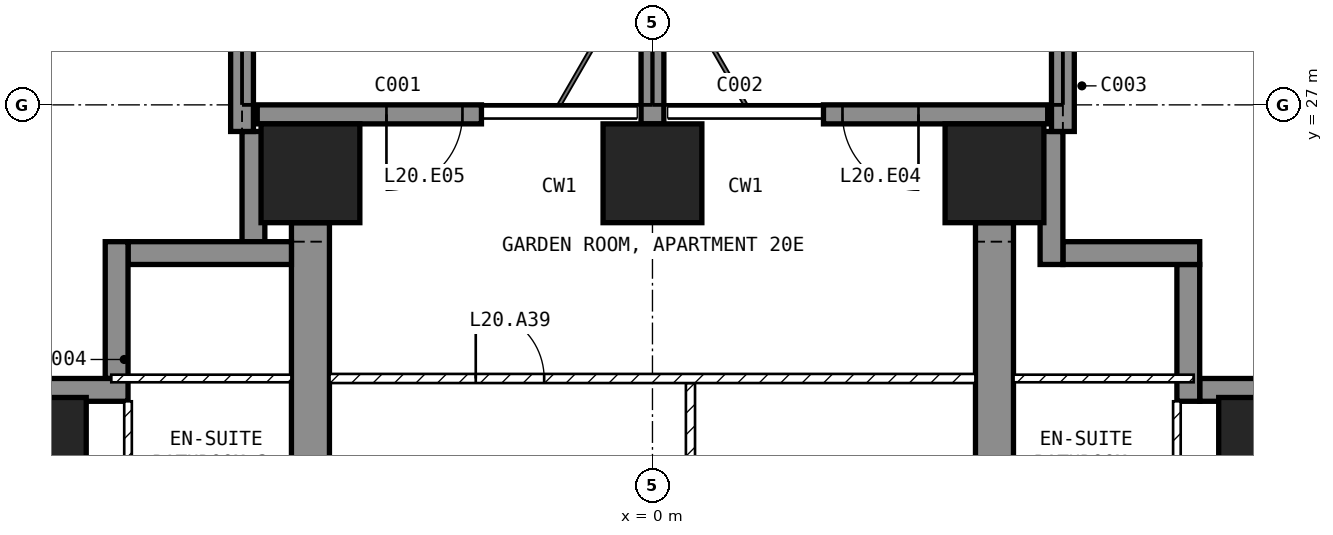
"""IFC4 building model, lengths in metres.
Left out: names, types, materials, properties, quantities, classifications, styles, units other than length and angle.
Written with IfcOpenShell. Run it as: python <this file> out.ifc"""

import sys

from ifc_helpers import new_model, si_unit, direction, frame, frame_2d, origin, origin_2d, place, context, subcontext, project, spatial, polyline, rectangle, outline, extrude, element, fill, save


model = new_model("IFC4")
c1 = context("Model", 3, precision=1e-05, world=origin(), true_north=direction((0.0, 1.0)))
c2 = subcontext(c1, "Body", "Model", "MODEL_VIEW")
j1 = project(units=[si_unit("LENGTHUNIT", "METRE"), si_unit("PLANEANGLEUNIT", "RADIAN")], contexts=[c1])
p1 = place(None, origin())
s1 = spatial("IfcSite", under=j1, at=p1, CompositionType="ELEMENT")
p2 = place(p1, origin())
s2 = spatial("IfcBuilding", under=s1, at=p2, CompositionType="ELEMENT")
p3 = place(p2, frame((0.0, 0.0, 89.0)))
s3 = spatial("IfcBuildingStorey", under=s2, at=p3, CompositionType="ELEMENT", Elevation=89.0)
for number, where, z_axis, x_axis in (
    (1, (-8.1, 22.5, -0.25), (0.0, 0.0, 1.0), (1.0, 0.0, 0.0)),
    (2, (-4.5, 26.1, -0.25), (0.0, 0.0, 1.0), (1.0, 0.0, 0.0)),
    (3, (0.0, 26.1, -0.25), (0.0, 0.0, 1.0), (1.0, 0.0, 0.0)),
    (4, (4.5, 26.1, -0.25), (0.0, 0.0, 1.0), (1.0, 0.0, 0.0)),
    (5, (8.1, 22.5, -0.25), (0.0, 0.0, 1.0), (1.0, 0.0, 0.0)),
):
    element("IfcColumn", number, at=place(p3, frame(where, z_axis=z_axis, x_axis=x_axis)), inside=s3, PredefinedType="COLUMN", context=c2, shape_type="SweptSolid", body=[
        extrude(rectangle(XDim=1.3, YDim=1.3, at=origin_2d()), origin(), (0.0, 0.0, 1.0), 3.45),
    ])
for number, where, z_axis, x_axis in (
    (6, (-4.75, 9.0, -0.25), (1.0, 0.0, 0.0), (0.0, 1.0, 0.0)),
    (7, (4.25, 9.0, -0.25), (1.0, 0.0, 0.0), (0.0, 1.0, 0.0)),
):
    element("IfcWall", number, at=place(p3, frame(where, z_axis=z_axis, x_axis=x_axis)), inside=s3, PredefinedType="SHEAR", context=c2, shape_type="SweptSolid", body=[
        extrude(outline(polyline([(0.0, 0.0), (2.1, 0.0), (2.1, 2.65), (4.5, 2.65), (4.5, 0.0), (9.9, 0.0), (9.9, 2.65), (12.3, 2.65), (12.3, 0.0), (16.45, 0.0), (16.45, 3.45), (0.0, 3.45), (0.0, 0.0)])), origin(), (0.0, 0.0, 1.0), 0.5),
    ])
p4 = place(p3, frame((5.2, 26.875, 0.0), z_axis=(0.0, 0.0, 1.0), x_axis=(-1.0, 0.0, 0.0)))
e8 = element("IfcWall", 8, at=p4, inside=s3, PredefinedType="SOLIDWALL", context=c2, shape_type="SweptSolid", body=[
    extrude(rectangle(XDim=2.95, YDim=0.25, at=frame_2d((1.475, 0.0))), origin(), (0.0, 0.0, 1.0), 3.2),
])
p5 = place(p4, frame((1.7, 0.0, 0.0)))
e9 = element("IfcOpeningElement", 9, at=p5, cuts=e8, PredefinedType="OPENING", context=c2, shape_type="SweptSolid", body=[
    extrude(rectangle(XDim=1.0, YDim=2.4, at=frame_2d((0.5, 1.2))), frame((0.0, 0.135, 0.0), z_axis=(0.0, -1.0, 0.0), x_axis=(1.0, 0.0, 0.0)), (0.0, 0.0, 1.0), 0.27),
])
p6 = place(p3, frame((-2.25, 26.875, 0.0), z_axis=(0.0, 0.0, 1.0), x_axis=(-1.0, 0.0, 0.0)))
e10 = element("IfcWall", 10, at=p6, inside=s3, PredefinedType="SOLIDWALL", context=c2, shape_type="SweptSolid", body=[
    extrude(rectangle(XDim=2.95, YDim=0.25, at=frame_2d((1.475, 0.0))), origin(), (0.0, 0.0, 1.0), 3.2),
])
p7 = place(p6, frame((0.25, 0.0, 0.0)))
e11 = element("IfcOpeningElement", 11, at=p7, cuts=e10, PredefinedType="OPENING", context=c2, shape_type="SweptSolid", body=[
    extrude(rectangle(XDim=1.0, YDim=2.4, at=frame_2d((0.5, 1.2))), frame((0.0, 0.135, 0.0), z_axis=(0.0, -1.0, 0.0), x_axis=(1.0, 0.0, 0.0)), (0.0, 0.0, 1.0), 0.27),
])
p8 = place(p3, frame((8.65, 23.25, 0.0), z_axis=(0.0, 0.0, 1.0), x_axis=(-1.0, 0.0, 0.0)))
e12 = element("IfcWall", 12, at=p8, inside=s3, PredefinedType="SOLIDWALL", context=c2, shape_type="SweptSolid", body=[
    extrude(rectangle(XDim=1.45, YDim=0.3, at=frame_2d((0.725, 0.0))), origin(), (0.0, 0.0, 1.0), 3.2),
])
p9 = place(p3, frame((7.05, 23.1, 0.0), z_axis=(0.0, 0.0, 1.0), x_axis=(0.0, 1.0, 0.0)))
e13 = element("IfcWall", 13, at=p9, inside=s3, PredefinedType="SOLIDWALL", context=c2, shape_type="SweptSolid", body=[
    extrude(rectangle(XDim=1.8, YDim=0.3, at=frame_2d((0.9, 0.0))), origin(), (0.0, 0.0, 1.0), 3.2),
])
p10 = place(p3, frame((7.2, 25.05, 0.0), z_axis=(0.0, 0.0, 1.0), x_axis=(-1.0, 0.0, 0.0)))
e14 = element("IfcWall", 14, at=p10, inside=s3, PredefinedType="SOLIDWALL", context=c2, shape_type="SweptSolid", body=[
    extrude(rectangle(XDim=1.8, YDim=0.3, at=frame_2d((0.9, 0.0))), origin(), (0.0, 0.0, 1.0), 3.2),
])
p11 = place(p3, frame((5.25, 24.9, 0.0), z_axis=(0.0, 0.0, 1.0), x_axis=(0.0, 1.0, 0.0)))
e15 = element("IfcWall", 15, at=p11, inside=s3, PredefinedType="SOLIDWALL", context=c2, shape_type="SweptSolid", body=[
    extrude(rectangle(XDim=1.75, YDim=0.3, at=frame_2d((0.875, 0.0))), origin(), (0.0, 0.0, 1.0), 3.2),
])
p12 = place(p3, frame((-5.25, 26.65, 0.0), z_axis=(0.0, 0.0, 1.0), x_axis=(0.0, -1.0, 0.0)))
e16 = element("IfcWall", 16, at=p12, inside=s3, PredefinedType="SOLIDWALL", context=c2, shape_type="SweptSolid", body=[
    extrude(rectangle(XDim=1.45, YDim=0.3, at=frame_2d((0.725, 0.0))), origin(), (0.0, 0.0, 1.0), 3.2),
])
p13 = place(p3, frame((-4.75, 25.05, 0.0), z_axis=(0.0, 0.0, 1.0), x_axis=(-1.0, 0.0, 0.0)))
e17 = element("IfcWall", 17, at=p13, inside=s3, PredefinedType="SOLIDWALL", context=c2, shape_type="SweptSolid", body=[
    extrude(rectangle(XDim=2.15, YDim=0.3, at=frame_2d((1.075, 0.0))), origin(), (0.0, 0.0, 1.0), 3.2),
])
p14 = place(p3, frame((-7.05, 25.2, 0.0), z_axis=(0.0, 0.0, 1.0), x_axis=(0.0, -1.0, 0.0)))
e18 = element("IfcWall", 18, at=p14, inside=s3, PredefinedType="SOLIDWALL", context=c2, shape_type="SweptSolid", body=[
    extrude(rectangle(XDim=1.8, YDim=0.3, at=frame_2d((0.9, 0.0))), origin(), (0.0, 0.0, 1.0), 3.2),
])
p15 = place(p3, frame((-6.9, 23.25, 0.0), z_axis=(0.0, 0.0, 1.0), x_axis=(-1.0, 0.0, 0.0)))
e19 = element("IfcWall", 19, at=p15, inside=s3, PredefinedType="SOLIDWALL", context=c2, shape_type="SweptSolid", body=[
    extrude(rectangle(XDim=1.75, YDim=0.3, at=frame_2d((0.875, 0.0))), origin(), (0.0, 0.0, 1.0), 3.2),
])
p16 = place(p3, frame((-5.4, 26.65, 0.0), z_axis=(0.0, 0.0, 1.0), x_axis=(0.0, 1.0, 0.0)))
e20 = element("IfcWall", 20, at=p16, inside=s3, PredefinedType="SOLIDWALL", context=c2, shape_type="SweptSolid", body=[
    extrude(rectangle(XDim=3.05, YDim=0.3, at=frame_2d((1.525, 0.0))), origin(), (0.0, 0.0, 1.0), 3.2),
])
p17 = place(p3, frame((0.0, 26.75, 0.0), z_axis=(0.0, 0.0, 1.0), x_axis=(0.0, 1.0, 0.0)))
e21 = element("IfcWall", 21, at=p17, inside=s3, PredefinedType="SOLIDWALL", context=c2, shape_type="SweptSolid", body=[
    extrude(rectangle(XDim=2.95, YDim=0.3, at=frame_2d((1.475, 0.0))), origin(), (0.0, 0.0, 1.0), 3.2),
])
p18 = place(p3, frame((5.4, 26.65, 0.0), z_axis=(0.0, 0.0, 1.0), x_axis=(0.0, 1.0, 0.0)))
e22 = element("IfcWall", 22, at=p18, inside=s3, PredefinedType="SOLIDWALL", context=c2, shape_type="SweptSolid", body=[
    extrude(rectangle(XDim=3.05, YDim=0.3, at=frame_2d((1.525, 0.0))), origin(), (0.0, 0.0, 1.0), 3.2),
])
p19 = place(p3, frame((0.5, 23.34, 0.0), z_axis=(0.0, 0.0, 1.0), x_axis=(0.0, -1.0, 0.0)))
e23 = element("IfcWall", 23, at=p19, inside=s3, PredefinedType="PARTITIONING", context=c2, shape_type="SweptSolid", body=[
    extrude(rectangle(XDim=4.38, YDim=0.12, at=frame_2d((2.19, 0.0))), origin(), (0.0, 0.0, 1.0), 3.2),
])
p20 = place(p19, frame((1.74, 0.0, 0.0)))
e24 = element("IfcOpeningElement", 24, at=p20, cuts=e23, PredefinedType="OPENING", context=c2, shape_type="SweptSolid", body=[
    extrude(rectangle(XDim=0.9, YDim=2.1, at=frame_2d((0.45, 1.05))), frame((0.0, 0.07, 0.0), z_axis=(0.0, -1.0, 0.0), x_axis=(1.0, 0.0, 0.0)), (0.0, 0.0, 1.0), 0.14),
])
p21 = place(p3, frame((-4.25, 23.4, 0.0), z_axis=(0.0, 0.0, 1.0), x_axis=(1.0, 0.0, 0.0)))
e25 = element("IfcWall", 25, at=p21, inside=s3, PredefinedType="PARTITIONING", context=c2, shape_type="SweptSolid", body=[
    extrude(rectangle(XDim=8.5, YDim=0.12, at=frame_2d((4.25, 0.0))), origin(), (0.0, 0.0, 1.0), 3.2),
])
p22 = place(p21, frame((1.925, 0.0, 0.0)))
e26 = element("IfcOpeningElement", 26, at=p22, cuts=e25, PredefinedType="OPENING", context=c2, shape_type="SweptSolid", body=[
    extrude(rectangle(XDim=0.9, YDim=2.1, at=frame_2d((0.45, 1.05))), frame((0.0, 0.07, 0.0), z_axis=(0.0, -1.0, 0.0), x_axis=(1.0, 0.0, 0.0)), (0.0, 0.0, 1.0), 0.14),
])
p23 = place(p3, frame((6.9, 20.45, 0.0), z_axis=(0.0, 0.0, 1.0), x_axis=(0.0, 1.0, 0.0)))
e27 = element("IfcWall", 27, at=p23, inside=s3, PredefinedType="PARTITIONING", context=c2, shape_type="SweptSolid", body=[
    extrude(rectangle(XDim=2.65, YDim=0.1, at=frame_2d((1.325, 0.0))), origin(), (0.0, 0.0, 1.0), 3.2),
])
p24 = place(p3, frame((4.75, 23.4, 0.0), z_axis=(0.0, 0.0, 1.0), x_axis=(1.0, 0.0, 0.0)))
e28 = element("IfcWall", 28, at=p24, inside=s3, PredefinedType="PARTITIONING", context=c2, shape_type="SweptSolid", body=[
    extrude(rectangle(XDim=2.37, YDim=0.1, at=frame_2d((1.185, 0.0))), origin(), (0.0, 0.0, 1.0), 3.2),
])
p25 = place(p3, frame((-6.9, 23.1, 0.0), z_axis=(0.0, 0.0, 1.0), x_axis=(0.0, -1.0, 0.0)))
e29 = element("IfcWall", 29, at=p25, inside=s3, PredefinedType="PARTITIONING", context=c2, shape_type="SweptSolid", body=[
    extrude(rectangle(XDim=2.65, YDim=0.1, at=frame_2d((1.325, 0.0))), origin(), (0.0, 0.0, 1.0), 3.2),
])
p26 = place(p3, frame((-7.12, 23.4, 0.0), z_axis=(0.0, 0.0, 1.0), x_axis=(1.0, 0.0, 0.0)))
e30 = element("IfcWall", 30, at=p26, inside=s3, PredefinedType="PARTITIONING", context=c2, shape_type="SweptSolid", body=[
    extrude(rectangle(XDim=2.37, YDim=0.1, at=frame_2d((1.185, 0.0))), origin(), (0.0, 0.0, 1.0), 3.2),
])
p27 = place(p5, origin())
e31 = element("IfcDoor", 31, at=p27, inside=s3, OperationType="SINGLE_SWING_LEFT", PredefinedType="DOOR", context=c2, shape_type="SweptSolid", body=[
    extrude(rectangle(XDim=1.0, YDim=2.4, at=frame_2d((0.5, 1.2))), frame((0.0, 0.025, 0.0), z_axis=(0.0, -1.0, 0.0), x_axis=(1.0, 0.0, 0.0)), (0.0, 0.0, 1.0), 0.05),
])
fill(e9, e31)
p28 = place(p7, origin())
e32 = element("IfcDoor", 32, at=p28, inside=s3, OperationType="SINGLE_SWING_RIGHT", PredefinedType="DOOR", context=c2, shape_type="SweptSolid", body=[
    extrude(rectangle(XDim=1.0, YDim=2.4, at=frame_2d((0.5, 1.2))), frame((0.0, 0.025, 0.0), z_axis=(0.0, -1.0, 0.0), x_axis=(1.0, 0.0, 0.0)), (0.0, 0.0, 1.0), 0.05),
])
fill(e11, e32)
p29 = place(p22, origin())
e33 = element("IfcDoor", 33, at=p29, inside=s3, OperationType="SINGLE_SWING_LEFT", PredefinedType="DOOR", context=c2, shape_type="SweptSolid", body=[
    extrude(rectangle(XDim=0.9, YDim=2.1, at=frame_2d((0.45, 1.05))), frame((0.0, 0.025, 0.0), z_axis=(0.0, -1.0, 0.0), x_axis=(1.0, 0.0, 0.0)), (0.0, 0.0, 1.0), 0.05),
])
fill(e26, e33)
save(model, sys.argv[1])
